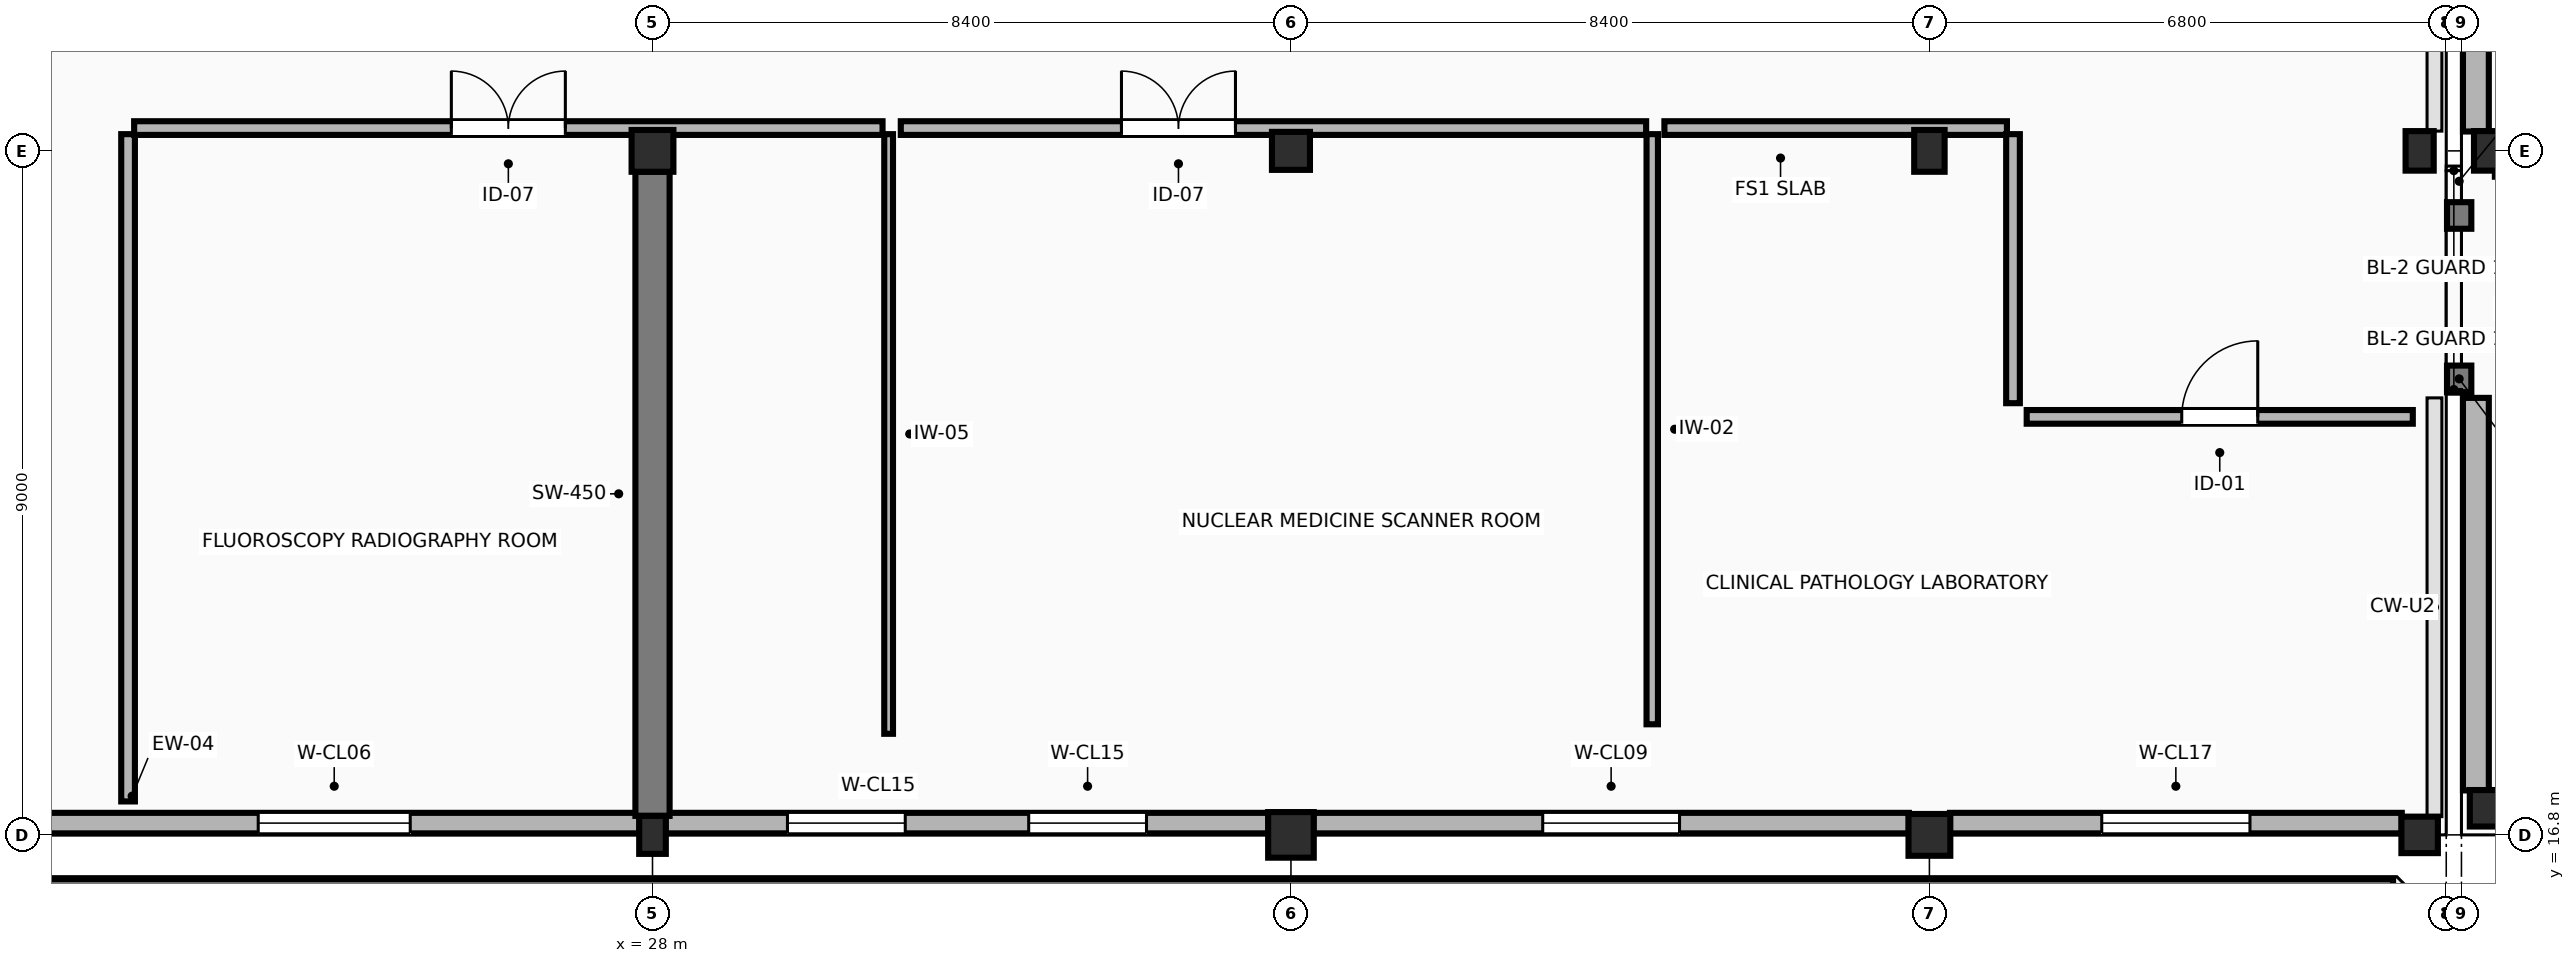
"""IFC4 building model, lengths in metres.
Left out: names, types, materials, properties, quantities, classifications, styles, units other than length and angle.
Written with IfcOpenShell. Run it as: python <this file> out.ifc"""

import sys

from ifc_helpers import new_model, si_unit, direction, frame, frame_2d, origin, origin_2d, place, context, subcontext, project, spatial, rectangle, extrude, element, fill, save


model = new_model("IFC4")
c1 = context("Model", 3, precision=1e-05, world=origin(), true_north=direction((0.0, 1.0)))
c2 = subcontext(c1, "Body", "Model", "MODEL_VIEW")
j1 = project(units=[si_unit("LENGTHUNIT", "METRE"), si_unit("PLANEANGLEUNIT", "RADIAN")], contexts=[c1])
p1 = place(None, origin())
s1 = spatial("IfcSite", under=j1, at=p1, CompositionType="ELEMENT")
p2 = place(p1, origin())
s2 = spatial("IfcBuilding", under=s1, at=p2, CompositionType="ELEMENT")
p3 = place(p2, frame((0.0, 0.0, 5.4)))
s3 = spatial("IfcBuildingStorey", under=s2, at=p3, CompositionType="ELEMENT", Elevation=5.4)
p4 = place(p3, frame((28.0, 16.8, 0.0), z_axis=(0.0, 0.0, 1.0), x_axis=(1.0, 0.0, 0.0)))
e1 = element("IfcColumn", 1, at=p4, inside=s3, PredefinedType="COLUMN", context=c2, shape_type="SweptSolid", body=[
    extrude(rectangle(XDim=0.35, YDim=0.5, at=origin_2d()), origin(), (0.0, 0.0, 1.0), 4.2),
])
p5 = place(p3, frame((28.0, 25.8, 0.0), z_axis=(0.0, 0.0, 1.0), x_axis=(1.0, 0.0, 0.0)))
e2 = element("IfcColumn", 2, at=p5, inside=s3, PredefinedType="COLUMN", context=c2, shape_type="SweptSolid", body=[
    extrude(rectangle(XDim=0.55, YDim=0.55, at=origin_2d()), origin(), (0.0, 0.0, 1.0), 4.2),
])
p6 = place(p3, frame((36.4, 16.8, 0.0), z_axis=(0.0, 0.0, 1.0), x_axis=(1.0, 0.0, 0.0)))
e3 = element("IfcColumn", 3, at=p6, inside=s3, PredefinedType="COLUMN", context=c2, shape_type="SweptSolid", body=[
    extrude(rectangle(XDim=0.6, YDim=0.6, at=origin_2d()), origin(), (0.0, 0.0, 1.0), 4.2),
])
p7 = place(p3, frame((36.4, 25.8, 0.0), z_axis=(0.0, 0.0, 1.0), x_axis=(1.0, 0.0, 0.0)))
e4 = element("IfcColumn", 4, at=p7, inside=s3, PredefinedType="COLUMN", context=c2, shape_type="SweptSolid", body=[
    extrude(rectangle(XDim=0.5, YDim=0.5, at=origin_2d()), origin(), (0.0, 0.0, 1.0), 4.2),
])
p8 = place(p3, frame((44.8, 16.8, 0.0), z_axis=(0.0, 0.0, 1.0), x_axis=(1.0, 0.0, 0.0)))
e5 = element("IfcColumn", 5, at=p8, inside=s3, PredefinedType="COLUMN", context=c2, shape_type="SweptSolid", body=[
    extrude(rectangle(XDim=0.55, YDim=0.55, at=origin_2d()), origin(), (0.0, 0.0, 1.0), 4.2),
])
p9 = place(p3, frame((44.8, 25.8, 0.0), z_axis=(0.0, 0.0, 1.0), x_axis=(1.0, 0.0, 0.0)))
e6 = element("IfcColumn", 6, at=p9, inside=s3, PredefinedType="COLUMN", context=c2, shape_type="SweptSolid", body=[
    extrude(rectangle(XDim=0.4, YDim=0.55, at=origin_2d()), origin(), (0.0, 0.0, 1.0), 4.2),
])
p10 = place(p3, frame((51.25, 16.8, 0.0), z_axis=(0.0, 0.0, 1.0), x_axis=(1.0, 0.0, 0.0)))
e7 = element("IfcColumn", 7, at=p10, inside=s3, PredefinedType="COLUMN", context=c2, shape_type="SweptSolid", body=[
    extrude(rectangle(XDim=0.48, YDim=0.48, at=origin_2d()), origin(), (0.0, 0.0, 1.0), 4.2),
])
p11 = place(p3, frame((51.25, 25.8, 0.0), z_axis=(0.0, 0.0, 1.0), x_axis=(1.0, 0.0, 0.0)))
e8 = element("IfcColumn", 8, at=p11, inside=s3, PredefinedType="COLUMN", context=c2, shape_type="SweptSolid", body=[
    extrude(rectangle(XDim=0.37, YDim=0.52, at=origin_2d()), origin(), (0.0, 0.0, 1.0), 4.2),
])
p12 = place(p3, frame((52.15, 17.15, 0.0), z_axis=(0.0, 0.0, 1.0), x_axis=(1.0, 0.0, 0.0)))
e9 = element("IfcColumn", 9, at=p12, inside=s3, PredefinedType="COLUMN", context=c2, shape_type="SweptSolid", body=[
    extrude(rectangle(XDim=0.48, YDim=0.48, at=origin_2d()), origin(), (0.0, 0.0, 1.0), 4.2),
])
p13 = place(p3, frame((52.15, 25.8, 0.0), z_axis=(0.0, 0.0, 1.0), x_axis=(1.0, 0.0, 0.0)))
e10 = element("IfcColumn", 10, at=p13, inside=s3, PredefinedType="COLUMN", context=c2, shape_type="SweptSolid", body=[
    extrude(rectangle(XDim=0.37, YDim=0.52, at=origin_2d()), origin(), (0.0, 0.0, 1.0), 4.2),
])
for number, where, z_axis, x_axis in (
    (11, (51.61, 22.8, 0.0), (0.0, 0.0, 1.0), (1.0, 0.0, 0.0)),
    (12, (51.61, 24.95, 0.0), (0.0, 0.0, 1.0), (1.0, 0.0, 0.0)),
):
    element("IfcWall", number, at=place(p3, frame(where, z_axis=z_axis, x_axis=x_axis)), inside=s3, PredefinedType="SHEAR", context=c2, shape_type="SweptSolid", body=[
        extrude(rectangle(XDim=0.32, YDim=0.35, at=frame_2d((0.16, 0.0))), origin(), (0.0, 0.0, 1.0), 2.323),
    ])
p14 = place(p3, frame((19.795, 16.955, 0.0), z_axis=(0.0, 0.0, 1.0), x_axis=(1.0, 0.0, 0.0)))
e13 = element("IfcWall", 13, at=p14, inside=s3, PredefinedType="STANDARD", context=c2, shape_type="SweptSolid", body=[
    extrude(rectangle(XDim=8.035, YDim=0.27, at=frame_2d((4.018, 0.0))), origin(), (0.0, 0.0, 1.0), 3.185),
])
p15 = place(p14, frame((3.018, 0.0, 0.95)))
e14 = element("IfcOpeningElement", 14, at=p15, cuts=e13, PredefinedType="OPENING", context=c2, shape_type="SweptSolid", body=[
    extrude(rectangle(XDim=2.0, YDim=1.6, at=frame_2d((1.0, 0.8))), frame((0.0, 0.145, 0.0), z_axis=(0.0, -1.0, 0.0), x_axis=(1.0, 0.0, 0.0)), (0.0, 0.0, 1.0), 0.29),
])
p16 = place(p3, frame((28.17, 16.955, 0.0), z_axis=(0.0, 0.0, 1.0), x_axis=(1.0, 0.0, 0.0)))
e15 = element("IfcWall", 15, at=p16, inside=s3, PredefinedType="STANDARD", context=c2, shape_type="SweptSolid", body=[
    extrude(rectangle(XDim=7.935, YDim=0.27, at=frame_2d((3.968, 0.0))), origin(), (0.0, 0.0, 1.0), 3.185),
])
p17 = place(p16, frame((1.605, 0.0, 0.95)))
e16 = element("IfcOpeningElement", 16, at=p17, cuts=e15, PredefinedType="OPENING", context=c2, shape_type="SweptSolid", body=[
    extrude(rectangle(XDim=1.55, YDim=1.45, at=frame_2d((0.775, 0.725))), frame((0.0, 0.145, 0.0), z_axis=(0.0, -1.0, 0.0), x_axis=(1.0, 0.0, 0.0)), (0.0, 0.0, 1.0), 0.29),
])
p18 = place(p16, frame((4.78, 0.0, 0.95)))
e17 = element("IfcOpeningElement", 17, at=p18, cuts=e15, PredefinedType="OPENING", context=c2, shape_type="SweptSolid", body=[
    extrude(rectangle(XDim=1.55, YDim=1.45, at=frame_2d((0.775, 0.725))), frame((0.0, 0.145, 0.0), z_axis=(0.0, -1.0, 0.0), x_axis=(1.0, 0.0, 0.0)), (0.0, 0.0, 1.0), 0.29),
])
p19 = place(p3, frame((36.695, 16.955, 0.0), z_axis=(0.0, 0.0, 1.0), x_axis=(1.0, 0.0, 0.0)))
e18 = element("IfcWall", 18, at=p19, inside=s3, PredefinedType="STANDARD", context=c2, shape_type="SweptSolid", body=[
    extrude(rectangle(XDim=7.835, YDim=0.27, at=frame_2d((3.917, 0.0))), origin(), (0.0, 0.0, 1.0), 3.185),
])
p20 = place(p19, frame((3.018, 0.0, 1.75)))
e19 = element("IfcOpeningElement", 19, at=p20, cuts=e18, PredefinedType="OPENING", context=c2, shape_type="SweptSolid", body=[
    extrude(rectangle(XDim=1.8, YDim=0.9, at=frame_2d((0.9, 0.45))), frame((0.0, 0.145, 0.0), z_axis=(0.0, -1.0, 0.0), x_axis=(1.0, 0.0, 0.0)), (0.0, 0.0, 1.0), 0.29),
])
p21 = place(p3, frame((45.07, 16.955, 0.0), z_axis=(0.0, 0.0, 1.0), x_axis=(1.0, 0.0, 0.0)))
e20 = element("IfcWall", 20, at=p21, inside=s3, PredefinedType="STANDARD", context=c2, shape_type="SweptSolid", body=[
    extrude(rectangle(XDim=5.945, YDim=0.27, at=frame_2d((2.972, 0.0))), origin(), (0.0, 0.0, 1.0), 3.385),
])
p22 = place(p21, frame((1.998, 0.0, 0.95)))
e21 = element("IfcOpeningElement", 21, at=p22, cuts=e20, PredefinedType="OPENING", context=c2, shape_type="SweptSolid", body=[
    extrude(rectangle(XDim=1.95, YDim=1.55, at=frame_2d((0.975, 0.775))), frame((0.0, 0.145, 0.0), z_axis=(0.0, -1.0, 0.0), x_axis=(1.0, 0.0, 0.0)), (0.0, 0.0, 1.0), 0.29),
])
p23 = place(p3, frame((51.99, 33.99, 0.0), z_axis=(0.0, 0.0, 1.0), x_axis=(0.0, -1.0, 0.0)))
e22 = element("IfcWall", 22, at=p23, inside=s3, PredefinedType="STANDARD", context=c2, shape_type="SweptSolid", body=[
    extrude(rectangle(XDim=7.935, YDim=0.34, at=frame_2d((3.968, 0.0))), origin(), (0.0, 0.0, 1.0), 3.365),
])
p24 = place(p3, frame((51.99, 22.55, 0.0), z_axis=(0.0, 0.0, 1.0), x_axis=(0.0, -1.0, 0.0)))
e23 = element("IfcWall", 23, at=p24, inside=s3, PredefinedType="STANDARD", context=c2, shape_type="SweptSolid", body=[
    extrude(rectangle(XDim=5.165, YDim=0.34, at=frame_2d((2.583, 0.0))), origin(), (0.0, 0.0, 1.0), 3.365),
])
p25 = place(p3, frame((50.9, 16.1, 0.0), z_axis=(0.0, 0.0, 1.0), x_axis=(-1.0, 0.0, 0.0)))
e24 = element("IfcWall", 24, at=p25, inside=s3, PredefinedType="PARAPET", context=c2, shape_type="SweptSolid", body=[
    extrude(rectangle(XDim=47.25, YDim=0.23, at=frame_2d((23.625, 0.0))), origin(), (0.0, 0.0, 1.0), 1.05),
])
p26 = place(p3, frame((28.0, 17.05, 0.0), z_axis=(0.0, 0.0, 1.0), x_axis=(0.0, 1.0, 0.0)))
e25 = element("IfcWall", 25, at=p26, inside=s3, PredefinedType="SHEAR", context=c2, shape_type="SweptSolid", body=[
    extrude(rectangle(XDim=8.475, YDim=0.45, at=frame_2d((4.237, 0.0))), origin(), (0.0, 0.0, 1.0), 3.85),
])
p27 = place(p3, frame((21.1, 17.24, 0.0), z_axis=(0.0, 0.0, 1.0), x_axis=(0.0, 1.0, 0.0)))
e26 = element("IfcWall", 26, at=p27, inside=s3, PredefinedType="PARTITIONING", context=c2, shape_type="SweptSolid", body=[
    extrude(rectangle(XDim=8.78, YDim=0.18, at=frame_2d((4.39, 0.0))), origin(), (0.0, 0.0, 1.0), 3.85),
])
p28 = place(p3, frame((21.18, 26.1, 0.0), z_axis=(0.0, 0.0, 1.0), x_axis=(1.0, 0.0, 0.0)))
e27 = element("IfcWall", 27, at=p28, inside=s3, PredefinedType="PARTITIONING", context=c2, shape_type="SweptSolid", body=[
    extrude(rectangle(XDim=9.847, YDim=0.18, at=frame_2d((4.923, 0.0))), origin(), (0.0, 0.0, 1.0), 3.185),
])
p29 = place(p28, frame((4.173, 0.0, 0.0)))
e28 = element("IfcOpeningElement", 28, at=p29, cuts=e27, PredefinedType="OPENING", context=c2, shape_type="SweptSolid", body=[
    extrude(rectangle(XDim=1.5, YDim=2.3, at=frame_2d((0.75, 1.15))), frame((0.0, 0.1, 0.0), z_axis=(0.0, -1.0, 0.0), x_axis=(1.0, 0.0, 0.0)), (0.0, 0.0, 1.0), 0.2),
])
p30 = place(p3, frame((31.107, 26.02, 0.0), z_axis=(0.0, 0.0, 1.0), x_axis=(0.0, -1.0, 0.0)))
e29 = element("IfcWall", 29, at=p30, inside=s3, PredefinedType="PARTITIONING", context=c2, shape_type="SweptSolid", body=[
    extrude(rectangle(XDim=7.89, YDim=0.115, at=frame_2d((3.945, 0.0))), origin(), (0.0, 0.0, 1.0), 3.484),
])
p31 = place(p3, frame((31.267, 26.1, 0.0), z_axis=(0.0, 0.0, 1.0), x_axis=(1.0, 0.0, 0.0)))
e30 = element("IfcWall", 30, at=p31, inside=s3, PredefinedType="PARTITIONING", context=c2, shape_type="SweptSolid", body=[
    extrude(rectangle(XDim=9.807, YDim=0.18, at=frame_2d((4.903, 0.0))), origin(), (0.0, 0.0, 1.0), 3.185),
])
p32 = place(p31, frame((2.903, 0.0, 0.0)))
e31 = element("IfcOpeningElement", 31, at=p32, cuts=e30, PredefinedType="OPENING", context=c2, shape_type="SweptSolid", body=[
    extrude(rectangle(XDim=1.5, YDim=2.3, at=frame_2d((0.75, 1.15))), frame((0.0, 0.1, 0.0), z_axis=(0.0, -1.0, 0.0), x_axis=(1.0, 0.0, 0.0)), (0.0, 0.0, 1.0), 0.2),
])
p33 = place(p3, frame((41.153, 26.02, 0.0), z_axis=(0.0, 0.0, 1.0), x_axis=(0.0, -1.0, 0.0)))
e32 = element("IfcWall", 32, at=p33, inside=s3, PredefinedType="PARTITIONING", context=c2, shape_type="SweptSolid", body=[
    extrude(rectangle(XDim=7.765, YDim=0.15, at=frame_2d((3.883, 0.0))), origin(), (0.0, 0.0, 1.0), 3.85),
])
p34 = place(p3, frame((41.313, 26.1, 0.0), z_axis=(0.0, 0.0, 1.0), x_axis=(1.0, 0.0, 0.0)))
e33 = element("IfcWall", 33, at=p34, inside=s3, PredefinedType="PARTITIONING", context=c2, shape_type="SweptSolid", body=[
    extrude(rectangle(XDim=4.507, YDim=0.18, at=frame_2d((2.253, 0.0))), origin(), (0.0, 0.0, 1.0), 3.185),
])
p35 = place(p3, frame((45.9, 26.02, 0.0), z_axis=(0.0, 0.0, 1.0), x_axis=(0.0, -1.0, 0.0)))
e34 = element("IfcWall", 34, at=p35, inside=s3, PredefinedType="PARTITIONING", context=c2, shape_type="SweptSolid", body=[
    extrude(rectangle(XDim=3.54, YDim=0.18, at=frame_2d((1.77, 0.0))), origin(), (0.0, 0.0, 1.0), 3.85),
])
p36 = place(p3, frame((46.08, 22.3, 0.0), z_axis=(0.0, 0.0, 1.0), x_axis=(1.0, 0.0, 0.0)))
e35 = element("IfcWall", 35, at=p36, inside=s3, PredefinedType="PARTITIONING", context=c2, shape_type="SweptSolid", body=[
    extrude(rectangle(XDim=5.08, YDim=0.18, at=frame_2d((2.54, 0.0))), origin(), (0.0, 0.0, 1.0), 3.85),
])
p37 = place(p36, frame((2.04, 0.0, 0.0)))
e36 = element("IfcOpeningElement", 36, at=p37, cuts=e35, PredefinedType="OPENING", context=c2, shape_type="SweptSolid", body=[
    extrude(rectangle(XDim=1.0, YDim=2.15, at=frame_2d((0.5, 1.075))), frame((0.0, 0.1, 0.0), z_axis=(0.0, -1.0, 0.0), x_axis=(1.0, 0.0, 0.0)), (0.0, 0.0, 1.0), 0.2),
])
p38 = place(p15, origin())
e37 = element("IfcWindow", 37, at=p38, inside=s3, PartitioningType="SINGLE_PANEL", PredefinedType="WINDOW", context=c2, shape_type="SweptSolid", body=[
    extrude(rectangle(XDim=2.0, YDim=1.6, at=frame_2d((1.0, 0.8))), frame((0.0, 0.03, 0.0), z_axis=(0.0, -1.0, 0.0), x_axis=(1.0, 0.0, 0.0)), (0.0, 0.0, 1.0), 0.06),
])
fill(e14, e37)
p39 = place(p17, origin())
e38 = element("IfcWindow", 38, at=p39, inside=s3, PartitioningType="SINGLE_PANEL", PredefinedType="WINDOW", context=c2, shape_type="SweptSolid", body=[
    extrude(rectangle(XDim=1.55, YDim=1.45, at=frame_2d((0.775, 0.725))), frame((0.0, 0.03, 0.0), z_axis=(0.0, -1.0, 0.0), x_axis=(1.0, 0.0, 0.0)), (0.0, 0.0, 1.0), 0.06),
])
fill(e16, e38)
p40 = place(p18, origin())
e39 = element("IfcWindow", 39, at=p40, inside=s3, PartitioningType="SINGLE_PANEL", PredefinedType="WINDOW", context=c2, shape_type="SweptSolid", body=[
    extrude(rectangle(XDim=1.55, YDim=1.45, at=frame_2d((0.775, 0.725))), frame((0.0, 0.03, 0.0), z_axis=(0.0, -1.0, 0.0), x_axis=(1.0, 0.0, 0.0)), (0.0, 0.0, 1.0), 0.06),
])
fill(e17, e39)
p41 = place(p20, origin())
e40 = element("IfcWindow", 40, at=p41, inside=s3, PartitioningType="SINGLE_PANEL", PredefinedType="WINDOW", context=c2, shape_type="SweptSolid", body=[
    extrude(rectangle(XDim=1.8, YDim=0.9, at=frame_2d((0.9, 0.45))), frame((0.0, 0.03, 0.0), z_axis=(0.0, -1.0, 0.0), x_axis=(1.0, 0.0, 0.0)), (0.0, 0.0, 1.0), 0.06),
])
fill(e19, e40)
p42 = place(p22, origin())
e41 = element("IfcWindow", 41, at=p42, inside=s3, PartitioningType="SINGLE_PANEL", PredefinedType="WINDOW", context=c2, shape_type="SweptSolid", body=[
    extrude(rectangle(XDim=1.95, YDim=1.55, at=frame_2d((0.975, 0.775))), frame((0.0, 0.03, 0.0), z_axis=(0.0, -1.0, 0.0), x_axis=(1.0, 0.0, 0.0)), (0.0, 0.0, 1.0), 0.06),
])
fill(e21, e41)
p43 = place(p29, origin())
e42 = element("IfcDoor", 42, at=p43, inside=s3, OperationType="DOUBLE_DOOR_SINGLE_SWING", PredefinedType="DOOR", context=c2, shape_type="SweptSolid", body=[
    extrude(rectangle(XDim=1.5, YDim=2.3, at=frame_2d((0.75, 1.15))), frame((0.0, 0.025, 0.0), z_axis=(0.0, -1.0, 0.0), x_axis=(1.0, 0.0, 0.0)), (0.0, 0.0, 1.0), 0.05),
])
fill(e28, e42)
p44 = place(p32, origin())
e43 = element("IfcDoor", 43, at=p44, inside=s3, OperationType="DOUBLE_DOOR_SINGLE_SWING", PredefinedType="DOOR", context=c2, shape_type="SweptSolid", body=[
    extrude(rectangle(XDim=1.5, YDim=2.3, at=frame_2d((0.75, 1.15))), frame((0.0, 0.025, 0.0), z_axis=(0.0, -1.0, 0.0), x_axis=(1.0, 0.0, 0.0)), (0.0, 0.0, 1.0), 0.05),
])
fill(e31, e43)
p45 = place(p37, origin())
e44 = element("IfcDoor", 44, at=p45, inside=s3, OperationType="SINGLE_SWING_RIGHT", PredefinedType="DOOR", context=c2, shape_type="SweptSolid", body=[
    extrude(rectangle(XDim=1.0, YDim=2.15, at=frame_2d((0.5, 1.075))), frame((0.0, 0.025, 0.0), z_axis=(0.0, -1.0, 0.0), x_axis=(1.0, 0.0, 0.0)), (0.0, 0.0, 1.0), 0.05),
])
fill(e36, e44)
save(model, sys.argv[1])
